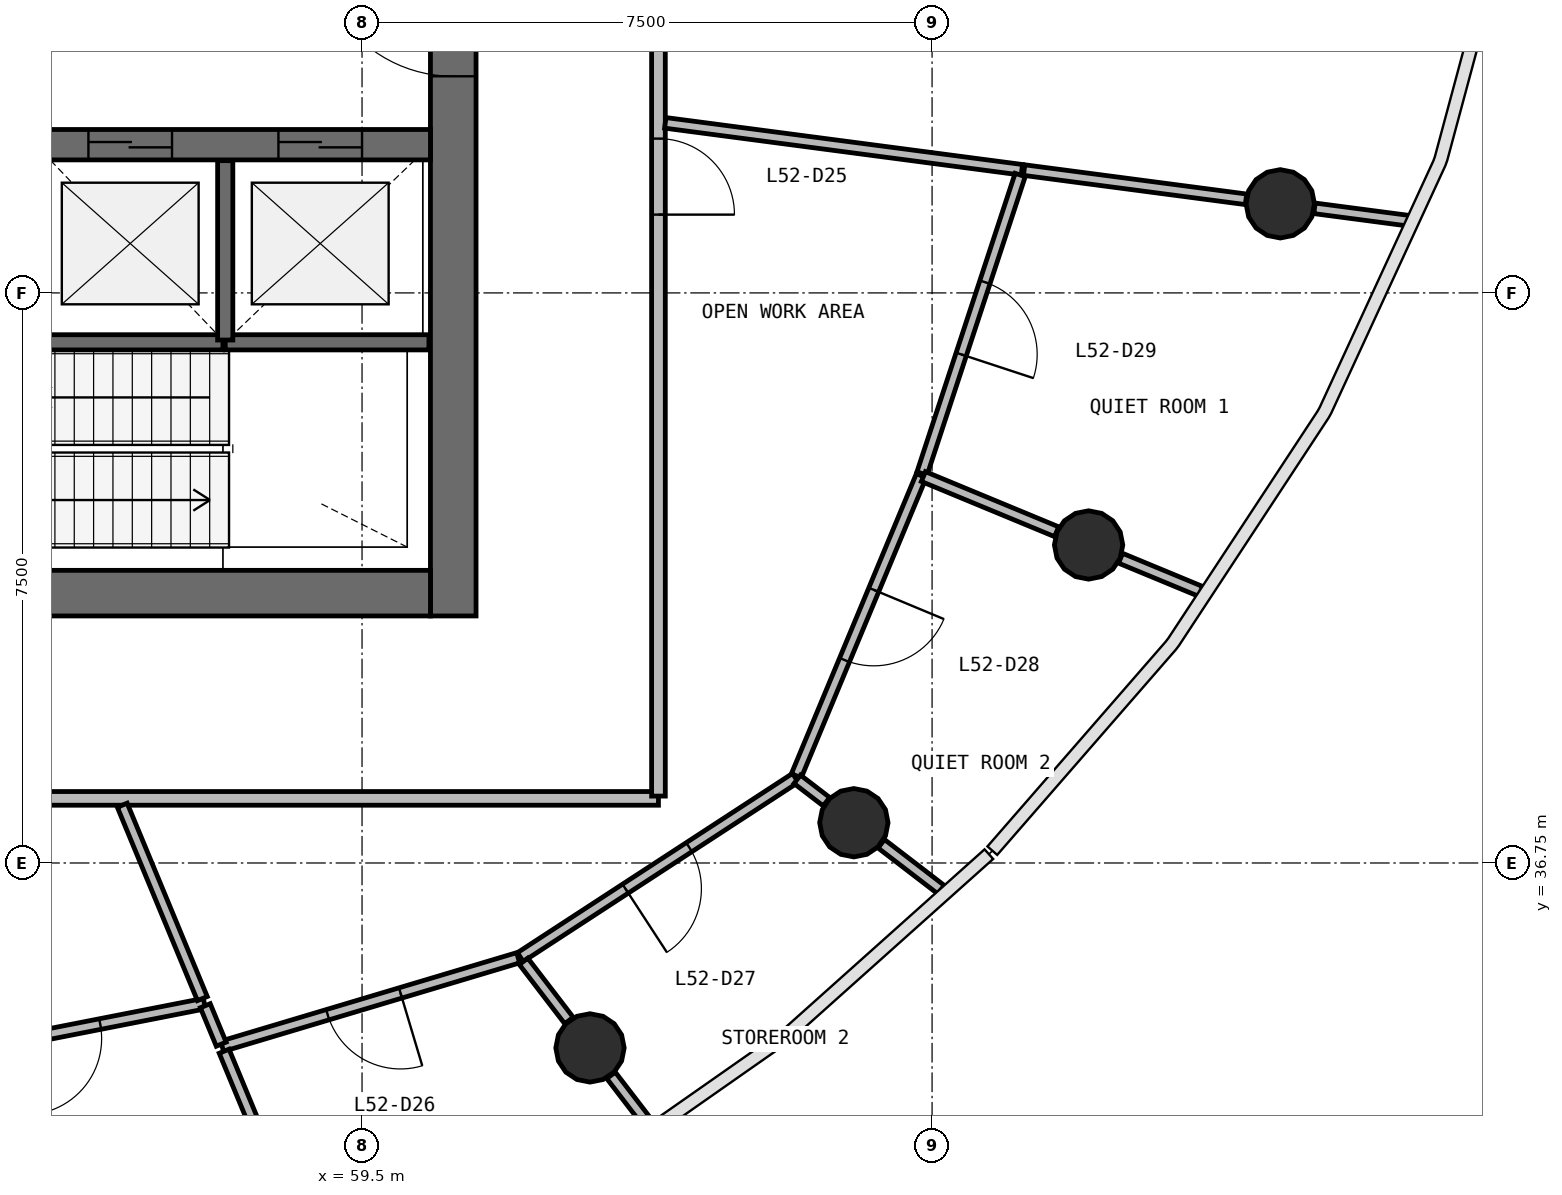
"""IFC4 building model, lengths in metres.
Left out: names, types, materials, properties, quantities, classifications, styles, units other than length and angle.
Written with IfcOpenShell. Run it as: python <this file> out.ifc"""

import sys

from ifc_helpers import new_model, si_unit, direction, frame, frame_2d, origin, origin_2d, place, context, subcontext, project, spatial, rectangle, circle, extrude, source, transform, mapped, element, fill, save


model = new_model("IFC4")
c1 = context("Model", 3, precision=1e-05, world=origin(), true_north=direction((0.0, 1.0)))
c2 = subcontext(c1, "Body", "Model", "MODEL_VIEW")
j1 = project(units=[si_unit("LENGTHUNIT", "METRE"), si_unit("PLANEANGLEUNIT", "RADIAN")], contexts=[c1])
p1 = place(None, origin())
s1 = spatial("IfcSite", under=j1, at=p1, CompositionType="ELEMENT")
p2 = place(p1, origin())
s2 = spatial("IfcBuilding", under=s1, at=p2, CompositionType="ELEMENT")
p3 = place(p2, frame((0.0, 0.0, 215.0)))
s3 = spatial("IfcBuildingStorey", under=s2, at=p3, CompositionType="ELEMENT", Elevation=215.0)
p4 = place(p3, frame((60.7, 40.0, 0.0), z_axis=(0.0, 0.0, 1.0), x_axis=(0.0, 1.0, 0.0)))
e1 = element("IfcWall", 1, at=p4, inside=s3, PredefinedType="SHEAR", context=c2, shape_type="SweptSolid", body=[
    extrude(rectangle(XDim=16.0, YDim=0.6, at=frame_2d((8.0, 0.0))), origin(), (0.0, 0.0, 1.0), 3.9),
])
p5 = place(p4, frame((7.1, 0.0, 0.0)))
e2 = element("IfcOpeningElement", 2, at=p5, cuts=e1, PredefinedType="OPENING", context=c2, shape_type="SweptSolid", body=[
    extrude(rectangle(XDim=1.8, YDim=2.1, at=frame_2d((0.9, 1.05))), frame((0.0, 0.31, 0.0), z_axis=(0.0, -1.0, 0.0), x_axis=(1.0, 0.0, 0.0)), (0.0, 0.0, 1.0), 0.62),
])
p6 = place(p3, frame((43.6, 40.3, 0.0), z_axis=(0.0, 0.0, 1.0), x_axis=(1.0, 0.0, 0.0)))
e3 = element("IfcWall", 3, at=p6, inside=s3, PredefinedType="SHEAR", context=c2, shape_type="SweptSolid", body=[
    extrude(rectangle(XDim=16.8, YDim=0.6, at=frame_2d((8.4, 0.0))), origin(), (0.0, 0.0, 1.0), 3.9),
])
p7 = place(p6, frame((10.3, 0.0, 0.0)))
e4 = element("IfcOpeningElement", 4, at=p7, cuts=e3, PredefinedType="OPENING", context=c2, shape_type="SweptSolid", body=[
    extrude(rectangle(XDim=1.2, YDim=2.1, at=frame_2d((0.6, 1.05))), frame((0.0, 0.31, 0.0), z_axis=(0.0, -1.0, 0.0), x_axis=(1.0, 0.0, 0.0)), (0.0, 0.0, 1.0), 0.62),
])
p8 = place(p6, frame((7.25, 0.0, 0.0)))
e5 = element("IfcOpeningElement", 5, at=p8, cuts=e3, PredefinedType="OPENING", context=c2, shape_type="SweptSolid", body=[
    extrude(rectangle(XDim=1.1, YDim=2.1, at=frame_2d((0.55, 1.05))), frame((0.0, 0.31, 0.0), z_axis=(0.0, -1.0, 0.0), x_axis=(1.0, 0.0, 0.0)), (0.0, 0.0, 1.0), 0.62),
])
p9 = place(p6, frame((0.7, 0.0, 0.0)))
e6 = element("IfcOpeningElement", 6, at=p9, cuts=e3, PredefinedType="OPENING", context=c2, shape_type="SweptSolid", body=[
    extrude(rectangle(XDim=0.8, YDim=2.1, at=frame_2d((0.4, 1.05))), frame((0.0, 0.31, 0.0), z_axis=(0.0, -1.0, 0.0), x_axis=(1.0, 0.0, 0.0)), (0.0, 0.0, 1.0), 0.62),
])
p10 = place(p3, frame((43.6, 46.2, 0.0), z_axis=(0.0, 0.0, 1.0), x_axis=(1.0, 0.0, 0.0)))
e7 = element("IfcWall", 7, at=p10, inside=s3, PredefinedType="SHEAR", context=c2, shape_type="SweptSolid", body=[
    extrude(rectangle(XDim=16.8, YDim=0.4, at=frame_2d((8.4, 0.0))), origin(), (0.0, 0.0, 1.0), 3.9),
])
p11 = place(p10, frame((9.8, 0.0, 0.0)))
e8 = element("IfcOpeningElement", 8, at=p11, cuts=e7, PredefinedType="OPENING", context=c2, shape_type="SweptSolid", body=[
    extrude(rectangle(XDim=1.1, YDim=2.1, at=frame_2d((0.55, 1.05))), frame((0.0, 0.21, 0.0), z_axis=(0.0, -1.0, 0.0), x_axis=(1.0, 0.0, 0.0)), (0.0, 0.0, 1.0), 0.42),
])
p12 = place(p10, frame((12.3, 0.0, 0.0)))
e9 = element("IfcOpeningElement", 9, at=p12, cuts=e7, PredefinedType="OPENING", context=c2, shape_type="SweptSolid", body=[
    extrude(rectangle(XDim=1.1, YDim=2.1, at=frame_2d((0.55, 1.05))), frame((0.0, 0.21, 0.0), z_axis=(0.0, -1.0, 0.0), x_axis=(1.0, 0.0, 0.0)), (0.0, 0.0, 1.0), 0.42),
])
p13 = place(p10, frame((14.8, 0.0, 0.0)))
e10 = element("IfcOpeningElement", 10, at=p13, cuts=e7, PredefinedType="OPENING", context=c2, shape_type="SweptSolid", body=[
    extrude(rectangle(XDim=1.1, YDim=2.1, at=frame_2d((0.55, 1.05))), frame((0.0, 0.21, 0.0), z_axis=(0.0, -1.0, 0.0), x_axis=(1.0, 0.0, 0.0)), (0.0, 0.0, 1.0), 0.42),
])
p14 = place(p10, frame((3.45, 0.0, 0.0)))
e11 = element("IfcOpeningElement", 11, at=p14, cuts=e7, PredefinedType="OPENING", context=c2, shape_type="SweptSolid", body=[
    extrude(rectangle(XDim=0.9, YDim=2.1, at=frame_2d((0.45, 1.05))), frame((0.0, 0.21, 0.0), z_axis=(0.0, -1.0, 0.0), x_axis=(1.0, 0.0, 0.0)), (0.0, 0.0, 1.0), 0.42),
])
p15 = place(p10, frame((7.85, 0.0, 0.0)))
e12 = element("IfcOpeningElement", 12, at=p15, cuts=e7, PredefinedType="OPENING", context=c2, shape_type="SweptSolid", body=[
    extrude(rectangle(XDim=0.9, YDim=2.1, at=frame_2d((0.45, 1.05))), frame((0.0, 0.21, 0.0), z_axis=(0.0, -1.0, 0.0), x_axis=(1.0, 0.0, 0.0)), (0.0, 0.0, 1.0), 0.42),
])
m1 = source(origin(), c2, "Body", "SweptSolid", [
    extrude(circle(Radius=0.45, at=origin_2d()), origin(), (0.0, 0.0, 1.0), 3.9),
])
for number, where, z_axis, x_axis in (
    (13, (62.499, 34.317, 0.0), (0.0, 0.0, 1.0), (1.0, 0.0, 0.0)),
    (14, (65.971, 37.28, 0.0), (0.0, 0.0, 1.0), (1.0, 0.0, 0.0)),
    (15, (69.059, 40.934, 0.0), (0.0, 0.0, 1.0), (1.0, 0.0, 0.0)),
    (16, (71.581, 45.422, 0.0), (0.0, 0.0, 1.0), (1.0, 0.0, 0.0)),
):
    element("IfcColumn", number, at=place(p3, frame(where, z_axis=z_axis, x_axis=x_axis)), inside=s3, PredefinedType="COLUMN", context=c2, shape_type="MappedRepresentation", body=[
        mapped(m1, transform((0.0, 0.0, 0.0), scale=1.0)),
    ])
p16 = place(p3, frame((57.7, 43.6, 0.0), z_axis=(0.0, 0.0, 1.0), x_axis=(1.0, 0.0, 0.0)))
e17 = element("IfcWall", 17, at=p16, inside=s3, PredefinedType="SOLIDWALL", context=c2, shape_type="SweptSolid", body=[
    extrude(rectangle(XDim=2.68, YDim=0.2, at=frame_2d((1.34, 0.0))), origin(), (0.0, 0.0, 1.0), 3.58),
])
p17 = place(p3, frame((55.2, 43.6, 0.0), z_axis=(0.0, 0.0, 1.0), x_axis=(1.0, 0.0, 0.0)))
e18 = element("IfcWall", 18, at=p17, inside=s3, PredefinedType="SOLIDWALL", context=c2, shape_type="SweptSolid", body=[
    extrude(rectangle(XDim=2.47, YDim=0.2, at=frame_2d((1.235, 0.0))), origin(), (0.0, 0.0, 1.0), 3.58),
])
p18 = place(p3, frame((57.7, 43.63, 0.0), z_axis=(0.0, 0.0, 1.0), x_axis=(0.0, 1.0, 0.0)))
e19 = element("IfcWall", 19, at=p18, inside=s3, PredefinedType="SOLIDWALL", context=c2, shape_type="SweptSolid", body=[
    extrude(rectangle(XDim=2.36, YDim=0.2, at=frame_2d((1.18, 0.0))), origin(), (0.0, 0.0, 1.0), 3.58),
])
p19 = place(p3, frame((63.4, 37.6, 0.0), z_axis=(0.0, 0.0, 1.0), x_axis=(-1.0, 0.0, 0.0)))
e20 = element("IfcWall", 20, at=p19, inside=s3, PredefinedType="PARTITIONING", context=c2, shape_type="SweptSolid", body=[
    extrude(rectangle(XDim=22.8, YDim=0.18, at=frame_2d((11.4, 0.0))), origin(), (0.0, 0.0, 1.0), 2.88),
])
p20 = place(p19, frame((16.05, 0.0, 0.0)))
e21 = element("IfcOpeningElement", 21, at=p20, cuts=e20, PredefinedType="OPENING", context=c2, shape_type="SweptSolid", body=[
    extrude(rectangle(XDim=0.9, YDim=2.1, at=frame_2d((0.45, 1.05))), frame((0.0, 0.1, 0.0), z_axis=(0.0, -1.0, 0.0), x_axis=(1.0, 0.0, 0.0)), (0.0, 0.0, 1.0), 0.2),
])
p21 = place(p19, frame((13.05, 0.0, 0.0)))
e22 = element("IfcOpeningElement", 22, at=p21, cuts=e20, PredefinedType="OPENING", context=c2, shape_type="SweptSolid", body=[
    extrude(rectangle(XDim=0.9, YDim=2.1, at=frame_2d((0.45, 1.05))), frame((0.0, 0.1, 0.0), z_axis=(0.0, -1.0, 0.0), x_axis=(1.0, 0.0, 0.0)), (0.0, 0.0, 1.0), 0.2),
])
p22 = place(p19, frame((10.95, 0.0, 0.0)))
e23 = element("IfcOpeningElement", 23, at=p22, cuts=e20, PredefinedType="OPENING", context=c2, shape_type="SweptSolid", body=[
    extrude(rectangle(XDim=1.0, YDim=2.1, at=frame_2d((0.5, 1.05))), frame((0.0, 0.1, 0.0), z_axis=(0.0, -1.0, 0.0), x_axis=(1.0, 0.0, 0.0)), (0.0, 0.0, 1.0), 0.2),
])
p23 = place(p19, frame((19.95, 0.0, 0.0)))
e24 = element("IfcOpeningElement", 24, at=p23, cuts=e20, PredefinedType="OPENING", context=c2, shape_type="SweptSolid", body=[
    extrude(rectangle(XDim=1.0, YDim=2.1, at=frame_2d((0.5, 1.05))), frame((0.0, 0.1, 0.0), z_axis=(0.0, -1.0, 0.0), x_axis=(1.0, 0.0, 0.0)), (0.0, 0.0, 1.0), 0.2),
])
p24 = place(p3, frame((63.4, 58.37, 0.0), z_axis=(0.0, 0.0, 1.0), x_axis=(0.0, -1.0, 0.0)))
e25 = element("IfcWall", 25, at=p24, inside=s3, PredefinedType="PARTITIONING", context=c2, shape_type="SweptSolid", body=[
    extrude(rectangle(XDim=20.74, YDim=0.18, at=frame_2d((10.37, 0.0))), origin(), (0.0, 0.0, 1.0), 2.88),
])
p25 = place(p24, frame((12.09, 0.0, 0.0)))
e26 = element("IfcOpeningElement", 26, at=p25, cuts=e25, PredefinedType="OPENING", context=c2, shape_type="SweptSolid", body=[
    extrude(rectangle(XDim=1.0, YDim=2.1, at=frame_2d((0.5, 1.05))), frame((0.0, 0.1, 0.0), z_axis=(0.0, -1.0, 0.0), x_axis=(1.0, 0.0, 0.0)), (0.0, 0.0, 1.0), 0.2),
])
p26 = place(p24, frame((9.89, 0.0, 0.0)))
e27 = element("IfcOpeningElement", 27, at=p26, cuts=e25, PredefinedType="OPENING", context=c2, shape_type="SweptSolid", body=[
    extrude(rectangle(XDim=1.0, YDim=2.1, at=frame_2d((0.5, 1.05))), frame((0.0, 0.1, 0.0), z_axis=(0.0, -1.0, 0.0), x_axis=(1.0, 0.0, 0.0)), (0.0, 0.0, 1.0), 0.2),
])
p27 = place(p24, frame((4.29, 0.0, 0.0)))
e28 = element("IfcOpeningElement", 28, at=p27, cuts=e25, PredefinedType="OPENING", context=c2, shape_type="SweptSolid", body=[
    extrude(rectangle(XDim=1.0, YDim=2.1, at=frame_2d((0.5, 1.05))), frame((0.0, 0.1, 0.0), z_axis=(0.0, -1.0, 0.0), x_axis=(1.0, 0.0, 0.0)), (0.0, 0.0, 1.0), 0.2),
])
p28 = place(p3, frame((63.49, 46.487, 0.0), z_axis=(0.0, 0.0, 1.0), x_axis=(0.99144375561, -0.130534591054, 0.0)))
e29 = element("IfcWall", 29, at=p28, inside=s3, PredefinedType="PARTITIONING", context=c2, shape_type="SweptSolid", body=[
    extrude(rectangle(XDim=4.732, YDim=0.14, at=frame_2d((2.366, 0.0))), origin(), (0.0, 0.0, 1.0), 2.88),
])
p29 = place(p3, frame((65.202, 37.87, 0.0), z_axis=(0.0, 0.0, 1.0), x_axis=(-0.837855616801, -0.545891899001, 0.0)))
e30 = element("IfcWall", 30, at=p29, inside=s3, PredefinedType="PARTITIONING", context=c2, shape_type="SweptSolid", body=[
    extrude(rectangle(XDim=4.32, YDim=0.14, at=frame_2d((2.16, 0.0))), origin(), (0.0, 0.0, 1.0), 2.88),
])
p30 = place(p29, frame((1.67, 0.0, 0.0)))
e31 = element("IfcOpeningElement", 31, at=p30, cuts=e30, PredefinedType="OPENING", context=c2, shape_type="SweptSolid", body=[
    extrude(rectangle(XDim=1.0, YDim=2.1, at=frame_2d((0.5, 1.05))), frame((0.0, 0.08, 0.0), z_axis=(0.0, -1.0, 0.0), x_axis=(1.0, 0.0, 0.0)), (0.0, 0.0, 1.0), 0.16),
])
p31 = place(p3, frame((66.858, 41.845, 0.0), z_axis=(0.0, 0.0, 1.0), x_axis=(-0.384501893961, -0.923124202662, 0.0)))
e32 = element("IfcWall", 32, at=p31, inside=s3, PredefinedType="PARTITIONING", context=c2, shape_type="SweptSolid", body=[
    extrude(rectangle(XDim=4.277, YDim=0.14, at=frame_2d((2.139, 0.0))), origin(), (0.0, 0.0, 1.0), 2.88),
])
p32 = place(p31, frame((1.627, 0.0, 0.0)))
e33 = element("IfcOpeningElement", 33, at=p32, cuts=e32, PredefinedType="OPENING", context=c2, shape_type="SweptSolid", body=[
    extrude(rectangle(XDim=1.0, YDim=2.1, at=frame_2d((0.5, 1.05))), frame((0.0, 0.08, 0.0), z_axis=(0.0, -1.0, 0.0), x_axis=(1.0, 0.0, 0.0)), (0.0, 0.0, 1.0), 0.16),
])
p33 = place(p3, frame((68.159, 45.802, 0.0), z_axis=(0.0, 0.0, 1.0), x_axis=(-0.312345892562, -0.94996844337, 0.0)))
e34 = element("IfcWall", 34, at=p33, inside=s3, PredefinedType="PARTITIONING", context=c2, shape_type="SweptSolid", body=[
    extrude(rectangle(XDim=4.135, YDim=0.14, at=frame_2d((2.067, 0.0))), origin(), (0.0, 0.0, 1.0), 2.88),
])
p34 = place(p33, frame((1.485, 0.0, 0.0)))
e35 = element("IfcOpeningElement", 35, at=p34, cuts=e34, PredefinedType="OPENING", context=c2, shape_type="SweptSolid", body=[
    extrude(rectangle(XDim=1.0, YDim=2.1, at=frame_2d((0.5, 1.05))), frame((0.0, 0.08, 0.0), z_axis=(0.0, -1.0, 0.0), x_axis=(1.0, 0.0, 0.0)), (0.0, 0.0, 1.0), 0.16),
])
p35 = place(p3, frame((61.554, 35.503, 0.0), z_axis=(0.0, 0.0, 1.0), x_axis=(-0.958115036861, -0.286383617097, 0.0)))
e36 = element("IfcWall", 36, at=p35, inside=s3, PredefinedType="PARTITIONING", context=c2, shape_type="SweptSolid", body=[
    extrude(rectangle(XDim=4.065, YDim=0.14, at=frame_2d((2.033, 0.0))), origin(), (0.0, 0.0, 1.0), 2.88),
])
p36 = place(p35, frame((1.615, 0.0, 0.0)))
e37 = element("IfcOpeningElement", 37, at=p36, cuts=e36, PredefinedType="OPENING", context=c2, shape_type="SweptSolid", body=[
    extrude(rectangle(XDim=1.0, YDim=2.1, at=frame_2d((0.5, 1.05))), frame((0.0, 0.08, 0.0), z_axis=(0.0, -1.0, 0.0), x_axis=(1.0, 0.0, 0.0)), (0.0, 0.0, 1.0), 0.16),
])
p37 = place(p3, frame((57.426, 34.9, 0.0), z_axis=(0.0, 0.0, 1.0), x_axis=(-0.981307553522, -0.192446058416, 0.0)))
e38 = element("IfcWall", 38, at=p37, inside=s3, PredefinedType="PARTITIONING", context=c2, shape_type="SweptSolid", body=[
    extrude(rectangle(XDim=3.647, YDim=0.14, at=frame_2d((1.824, 0.0))), origin(), (0.0, 0.0, 1.0), 2.88),
])
p38 = place(p37, frame((1.397, 0.0, 0.0)))
e39 = element("IfcOpeningElement", 39, at=p38, cuts=e38, PredefinedType="OPENING", context=c2, shape_type="SweptSolid", body=[
    extrude(rectangle(XDim=1.0, YDim=2.1, at=frame_2d((0.5, 1.05))), frame((0.0, 0.08, 0.0), z_axis=(0.0, -1.0, 0.0), x_axis=(1.0, 0.0, 0.0)), (0.0, 0.0, 1.0), 0.16),
])
p39 = place(p3, frame((68.211, 45.866, 0.0), z_axis=(0.0, 0.0, 1.0), x_axis=(0.991446673779, -0.1305124249, 0.0)))
e40 = element("IfcWall", 40, at=p39, inside=s3, PredefinedType="PARTITIONING", context=c2, shape_type="SweptSolid", body=[
    extrude(rectangle(XDim=2.944, YDim=0.14, at=frame_2d((1.472, 0.0))), origin(), (0.0, 0.0, 1.0), 2.88),
])
p40 = place(p3, frame((56.345, 37.51, 0.0), z_axis=(0.0, 0.0, 1.0), x_axis=(0.382675461762, -0.923882834003, 0.0)))
e41 = element("IfcWall", 41, at=p40, inside=s3, PredefinedType="PARTITIONING", context=c2, shape_type="SweptSolid", body=[
    extrude(rectangle(XDim=2.753, YDim=0.14, at=frame_2d((1.377, 0.0))), origin(), (0.0, 0.0, 1.0), 2.88),
])
p41 = place(p3, frame((57.686, 34.274, 0.0), z_axis=(0.0, 0.0, 1.0), x_axis=(0.382586213673, -0.92391979582, 0.0)))
e42 = element("IfcWall", 42, at=p41, inside=s3, PredefinedType="PARTITIONING", context=c2, shape_type="SweptSolid", body=[
    extrude(rectangle(XDim=1.932, YDim=0.14, at=frame_2d((0.966, 0.0))), origin(), (0.0, 0.0, 1.0), 2.88),
])
p42 = place(p3, frame((66.886, 41.834, 0.0), z_axis=(0.0, 0.0, 1.0), x_axis=(0.923881960825, -0.382677569846, 0.0)))
e43 = element("IfcWall", 43, at=p42, inside=s3, PredefinedType="PARTITIONING", context=c2, shape_type="SweptSolid", body=[
    extrude(rectangle(XDim=1.897, YDim=0.14, at=frame_2d((0.949, 0.0))), origin(), (0.0, 0.0, 1.0), 2.88),
])
p43 = place(p3, frame((72.031, 45.363, 0.0), z_axis=(0.0, 0.0, 1.0), x_axis=(0.991456301327, -0.1304392677, 0.0)))
e44 = element("IfcWall", 44, at=p43, inside=s3, PredefinedType="PARTITIONING", context=c2, shape_type="SweptSolid", body=[
    extrude(rectangle(XDim=1.243, YDim=0.14, at=frame_2d((0.621, 0.0))), origin(), (0.0, 0.0, 1.0), 2.88),
])
p44 = place(p3, frame((69.48, 40.76, 0.0), z_axis=(0.0, 0.0, 1.0), x_axis=(0.92392296186, -0.38257856781, 0.0)))
e45 = element("IfcWall", 45, at=p44, inside=s3, PredefinedType="PARTITIONING", context=c2, shape_type="SweptSolid", body=[
    extrude(rectangle(XDim=1.141, YDim=0.14, at=frame_2d((0.571, 0.0))), origin(), (0.0, 0.0, 1.0), 2.88),
])
p45 = place(p3, frame((61.625, 35.456, 0.0), z_axis=(0.0, 0.0, 1.0), x_axis=(0.608724079915, -0.793381997862, 0.0)))
e46 = element("IfcWall", 46, at=p45, inside=s3, PredefinedType="PARTITIONING", context=c2, shape_type="SweptSolid", body=[
    extrude(rectangle(XDim=0.981, YDim=0.14, at=frame_2d((0.49, 0.0))), origin(), (0.0, 0.0, 1.0), 2.88),
])
p46 = place(p3, frame((66.332, 37.003, 0.0), z_axis=(0.0, 0.0, 1.0), x_axis=(0.793419984166, -0.608674567176, 0.0)))
e47 = element("IfcWall", 47, at=p46, inside=s3, PredefinedType="PARTITIONING", context=c2, shape_type="SweptSolid", body=[
    extrude(rectangle(XDim=0.991, YDim=0.14, at=frame_2d((0.496, 0.0))), origin(), (0.0, 0.0, 1.0), 2.88),
])
p47 = place(p3, frame((62.776, 33.956, 0.0), z_axis=(0.0, 0.0, 1.0), x_axis=(0.609006416532, -0.793165294641, 0.0)))
e48 = element("IfcWall", 48, at=p47, inside=s3, PredefinedType="PARTITIONING", context=c2, shape_type="SweptSolid", body=[
    extrude(rectangle(XDim=0.838, YDim=0.14, at=frame_2d((0.419, 0.0))), origin(), (0.0, 0.0, 1.0), 2.88),
])
p48 = place(p3, frame((57.438, 34.872, 0.0), z_axis=(0.0, 0.0, 1.0), x_axis=(0.382430528233, -0.923984248283, 0.0)))
e49 = element("IfcWall", 49, at=p48, inside=s3, PredefinedType="PARTITIONING", context=c2, shape_type="SweptSolid", body=[
    extrude(rectangle(XDim=0.548, YDim=0.14, at=frame_2d((0.274, 0.0))), origin(), (0.0, 0.0, 1.0), 2.88),
])
p49 = place(p3, frame((65.226, 37.851, 0.0), z_axis=(0.0, 0.0, 1.0), x_axis=(0.793298003937, -0.608833537964, 0.0)))
e50 = element("IfcWall", 50, at=p49, inside=s3, PredefinedType="PARTITIONING", context=c2, shape_type="SweptSolid", body=[
    extrude(rectangle(XDim=0.484, YDim=0.14, at=frame_2d((0.242, 0.0))), origin(), (0.0, 0.0, 1.0), 2.88),
])
m2 = source(origin(), c2, "Body", "SweptSolid", [
    extrude(rectangle(XDim=1.8, YDim=2.1, at=frame_2d((0.9, 1.05))), frame((0.0, 0.025, 0.0), z_axis=(0.0, -1.0, 0.0), x_axis=(1.0, 0.0, 0.0)), (0.0, 0.0, 1.0), 0.05),
])
p50 = place(p5, origin())
e51 = element("IfcDoor", 51, at=p50, inside=s3, OperationType="SINGLE_SWING_RIGHT", PredefinedType="DOOR", context=c2, shape_type="MappedRepresentation", body=[
    mapped(m2, transform((0.0, 0.0, 0.0), scale=1.0)),
])
fill(e2, e51)
m3 = source(origin(), c2, "Body", "SweptSolid", [
    extrude(rectangle(XDim=1.1, YDim=2.1, at=frame_2d((0.55, 1.05))), frame((0.0, 0.025, 0.0), z_axis=(0.0, -1.0, 0.0), x_axis=(1.0, 0.0, 0.0)), (0.0, 0.0, 1.0), 0.05),
])
p51 = place(p12, origin())
e52 = element("IfcDoor", 52, at=p51, inside=s3, OperationType="DOUBLE_DOOR_SLIDING", PredefinedType="USERDEFINED", context=c2, shape_type="MappedRepresentation", body=[
    mapped(m3, transform((0.0, 0.0, 0.0), scale=1.0)),
])
fill(e9, e52)
p52 = place(p13, origin())
e53 = element("IfcDoor", 53, at=p52, inside=s3, OperationType="DOUBLE_DOOR_SLIDING", PredefinedType="USERDEFINED", context=c2, shape_type="MappedRepresentation", body=[
    mapped(m3, transform((0.0, 0.0, 0.0), scale=1.0)),
])
fill(e10, e53)
m4 = source(origin(), c2, "Body", "SweptSolid", [
    extrude(rectangle(XDim=1.0, YDim=2.1, at=frame_2d((0.5, 1.05))), frame((0.0, 0.025, 0.0), z_axis=(0.0, -1.0, 0.0), x_axis=(1.0, 0.0, 0.0)), (0.0, 0.0, 1.0), 0.05),
])
p53 = place(p38, origin())
e54 = element("IfcDoor", 54, at=p53, inside=s3, OperationType="SINGLE_SWING_RIGHT", PredefinedType="DOOR", context=c2, shape_type="MappedRepresentation", body=[
    mapped(m4, transform((0.0, 0.0, 0.0), scale=1.0)),
])
fill(e39, e54)
p54 = place(p25, origin())
e55 = element("IfcDoor", 55, at=p54, inside=s3, OperationType="SINGLE_SWING_RIGHT", PredefinedType="DOOR", context=c2, shape_type="MappedRepresentation", body=[
    mapped(m4, transform((0.0, 0.0, 0.0), scale=1.0)),
])
fill(e26, e55)
p55 = place(p36, origin())
e56 = element("IfcDoor", 56, at=p55, inside=s3, OperationType="SINGLE_SWING_LEFT", PredefinedType="DOOR", context=c2, shape_type="MappedRepresentation", body=[
    mapped(m4, transform((0.0, 0.0, 0.0), scale=1.0)),
])
fill(e37, e56)
p56 = place(p30, origin())
e57 = element("IfcDoor", 57, at=p56, inside=s3, OperationType="SINGLE_SWING_RIGHT", PredefinedType="DOOR", context=c2, shape_type="MappedRepresentation", body=[
    mapped(m4, transform((0.0, 0.0, 0.0), scale=1.0)),
])
fill(e31, e57)
p57 = place(p32, origin())
e58 = element("IfcDoor", 58, at=p57, inside=s3, OperationType="SINGLE_SWING_LEFT", PredefinedType="DOOR", context=c2, shape_type="MappedRepresentation", body=[
    mapped(m4, transform((0.0, 0.0, 0.0), scale=1.0)),
])
fill(e33, e58)
p58 = place(p34, origin())
e59 = element("IfcDoor", 59, at=p58, inside=s3, OperationType="SINGLE_SWING_RIGHT", PredefinedType="DOOR", context=c2, shape_type="MappedRepresentation", body=[
    mapped(m4, transform((0.0, 0.0, 0.0), scale=1.0)),
])
fill(e35, e59)
save(model, sys.argv[1])
